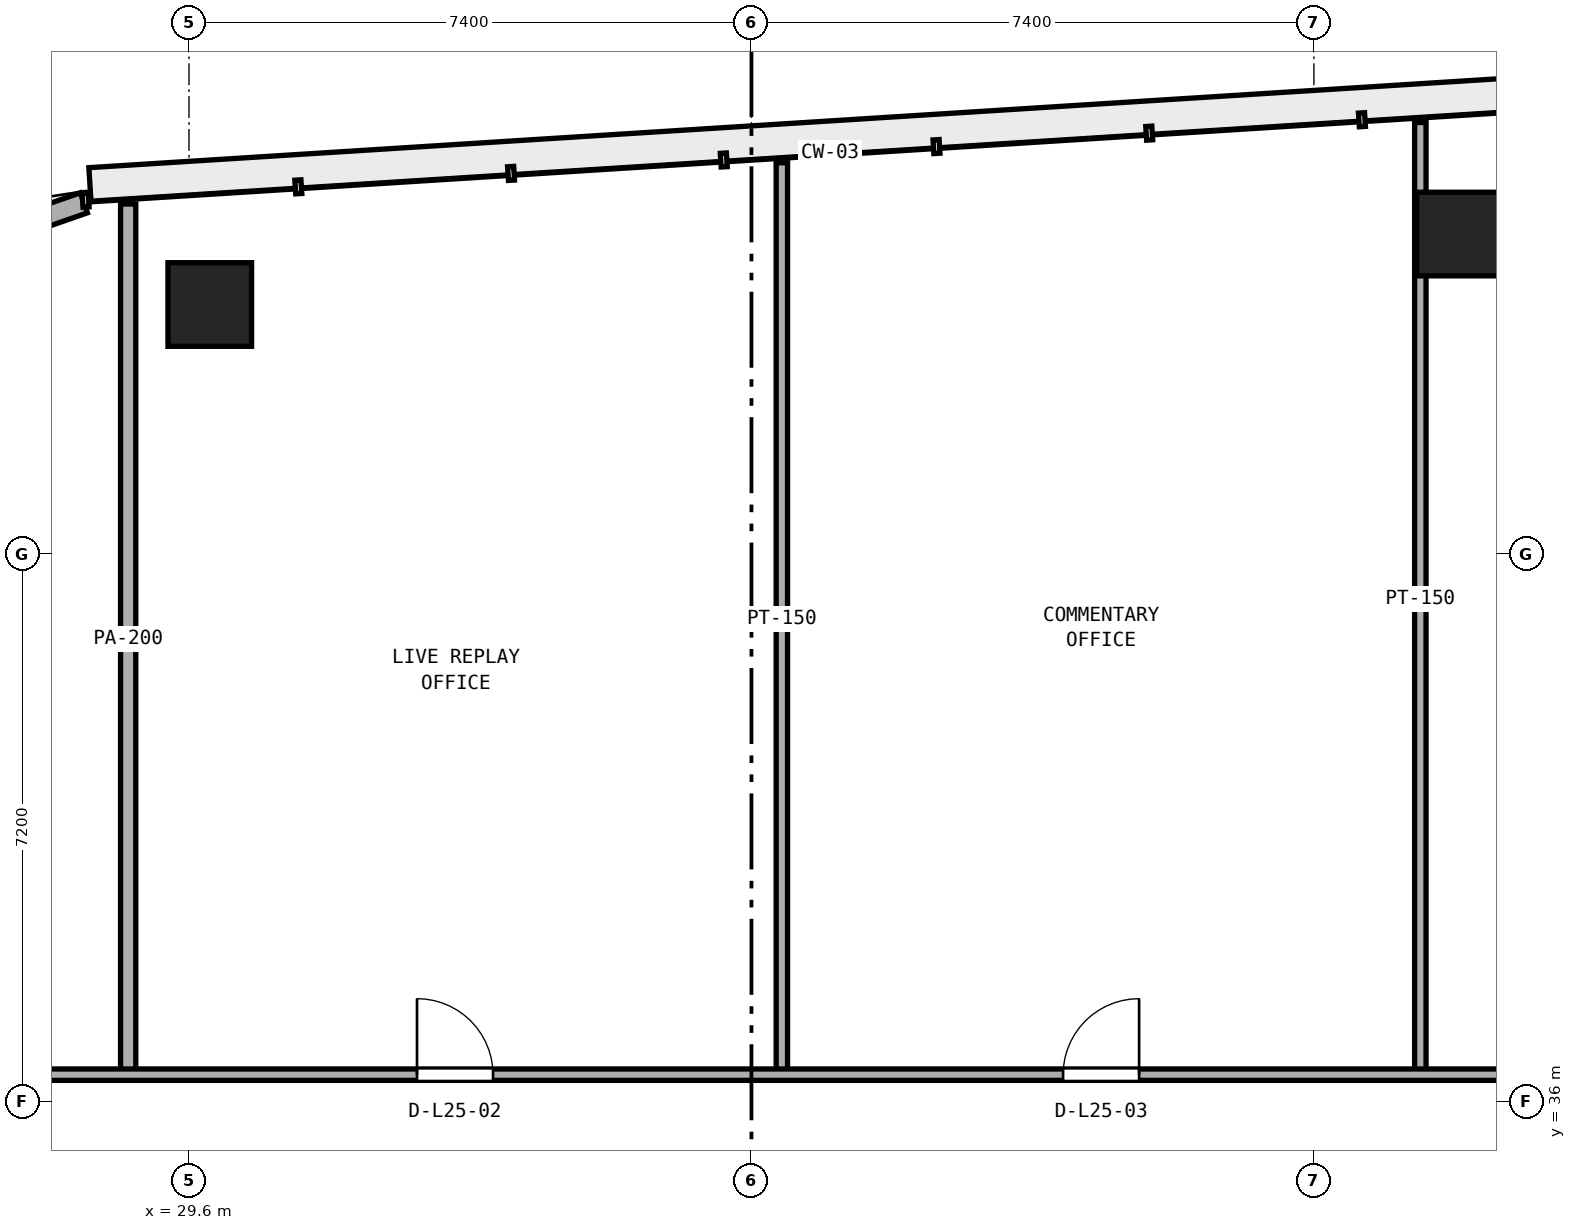
"""IFC4 building model, lengths in metres.
Left out: names, types, materials, properties, quantities, classifications, styles, units other than length and angle.
Written with IfcOpenShell. Run it as: python <this file> out.ifc"""

import sys

from ifc_helpers import new_model, si_unit, direction, frame, frame_2d, origin, origin_2d, place, context, subcontext, project, spatial, rectangle, extrude, element, fill, save


model = new_model("IFC4")
c1 = context("Model", 3, precision=1e-05, world=origin(), true_north=direction((0.0, 1.0)))
c2 = subcontext(c1, "Body", "Model", "MODEL_VIEW")
j1 = project(units=[si_unit("LENGTHUNIT", "METRE"), si_unit("PLANEANGLEUNIT", "RADIAN")], contexts=[c1])
p1 = place(None, origin())
s1 = spatial("IfcSite", under=j1, at=p1, CompositionType="ELEMENT")
p2 = place(p1, origin())
s2 = spatial("IfcBuilding", under=s1, at=p2, CompositionType="ELEMENT")
p3 = place(p2, frame((0.0, 0.0, 101.0)))
s3 = spatial("IfcBuildingStorey", under=s2, at=p3, CompositionType="ELEMENT", Elevation=101.0)
for number, where, z_axis, x_axis in (
    (1, (46.302, 47.409, 0.0), (0.0, 0.0, 1.0), (1.0, 0.0, 0.0)),
    (2, (29.874, 46.482, 0.0), (0.0, 0.0, 1.0), (1.0, 0.0, 0.0)),
):
    element("IfcColumn", number, at=place(p3, frame(where, z_axis=z_axis, x_axis=x_axis)), inside=s3, PredefinedType="COLUMN", context=c2, shape_type="SweptSolid", body=[
        extrude(rectangle(XDim=1.1, YDim=1.1, at=origin_2d()), origin(), (0.0, 0.0, 1.0), 3.8),
    ])
p4 = place(p3, frame((45.8, 36.35, 0.0), z_axis=(0.0, 0.0, 1.0), x_axis=(0.0, 1.0, 0.0)))
e3 = element("IfcWall", 3, at=p4, inside=s3, PredefinedType="PARTITIONING", context=c2, shape_type="SweptSolid", body=[
    extrude(rectangle(XDim=12.526, YDim=0.15, at=frame_2d((6.263, 0.0))), origin(), (0.0, 0.0, 1.0), 3.525),
])
p5 = place(p3, frame((37.4, 36.35, 0.0), z_axis=(0.0, 0.0, 1.0), x_axis=(0.0, 1.0, 0.0)))
e4 = element("IfcWall", 4, at=p5, inside=s3, PredefinedType="PARTITIONING", context=c2, shape_type="SweptSolid", body=[
    extrude(rectangle(XDim=11.997, YDim=0.15, at=frame_2d((5.998, 0.0))), origin(), (0.0, 0.0, 1.0), 3.525),
])
p6 = place(p3, frame((28.8, 36.35, 0.0), z_axis=(0.0, 0.0, 1.0), x_axis=(0.0, 1.0, 0.0)))
e5 = element("IfcWall", 5, at=p6, inside=s3, PredefinedType="PARTITIONING", context=c2, shape_type="SweptSolid", body=[
    extrude(rectangle(XDim=11.454, YDim=0.2, at=frame_2d((5.727, 0.0))), origin(), (0.0, 0.0, 1.0), 3.525),
])
p7 = place(p3, frame((22.45, 36.35, 0.0), z_axis=(0.0, 0.0, 1.0), x_axis=(1.0, 0.0, 0.0)))
e6 = element("IfcWall", 6, at=p7, inside=s3, PredefinedType="PARTITIONING", context=c2, shape_type="SweptSolid", body=[
    extrude(rectangle(XDim=29.1, YDim=0.15, at=frame_2d((14.55, 0.0))), origin(), (0.0, 0.0, 1.0), 3.525),
])
p8 = place(p7, frame((2.795, 0.0, 0.0)))
e7 = element("IfcOpeningElement", 7, at=p8, cuts=e6, PredefinedType="OPENING", context=c2, shape_type="SweptSolid", body=[
    extrude(rectangle(XDim=1.0, YDim=2.12, at=frame_2d((0.5, 1.06))), frame((0.0, 0.085, 0.0), z_axis=(0.0, -1.0, 0.0), x_axis=(1.0, 0.0, 0.0)), (0.0, 0.0, 1.0), 0.17),
])
p9 = place(p7, frame((10.15, 0.0, 0.0)))
e8 = element("IfcOpeningElement", 8, at=p9, cuts=e6, PredefinedType="OPENING", context=c2, shape_type="SweptSolid", body=[
    extrude(rectangle(XDim=1.0, YDim=2.12, at=frame_2d((0.5, 1.06))), frame((0.0, 0.085, 0.0), z_axis=(0.0, -1.0, 0.0), x_axis=(1.0, 0.0, 0.0)), (0.0, 0.0, 1.0), 0.17),
])
p10 = place(p7, frame((18.65, 0.0, 0.0)))
e9 = element("IfcOpeningElement", 9, at=p10, cuts=e6, PredefinedType="OPENING", context=c2, shape_type="SweptSolid", body=[
    extrude(rectangle(XDim=1.0, YDim=2.12, at=frame_2d((0.5, 1.06))), frame((0.0, 0.085, 0.0), z_axis=(0.0, -1.0, 0.0), x_axis=(1.0, 0.0, 0.0)), (0.0, 0.0, 1.0), 0.17),
])
p11 = place(p7, frame((25.605, 0.0, 0.0)))
e10 = element("IfcOpeningElement", 10, at=p11, cuts=e6, PredefinedType="OPENING", context=c2, shape_type="SweptSolid", body=[
    extrude(rectangle(XDim=1.0, YDim=2.12, at=frame_2d((0.5, 1.06))), frame((0.0, 0.085, 0.0), z_axis=(0.0, -1.0, 0.0), x_axis=(1.0, 0.0, 0.0)), (0.0, 0.0, 1.0), 0.17),
])
p12 = place(p3, frame((28.217, 47.82, 0.0), z_axis=(0.0, 0.0, 1.0), x_axis=(-0.944478751803, -0.328572499447, 0.0)))
e11 = element("IfcWall", 11, at=p12, inside=s3, PredefinedType="STANDARD", context=c2, shape_type="SweptSolid", body=[
    extrude(rectangle(XDim=2.19, YDim=0.28, at=frame_2d((1.095, 0.0))), origin(), (0.0, 0.0, 1.0), 3.525),
])
p13 = place(p9, origin())
e12 = element("IfcDoor", 12, at=p13, inside=s3, OperationType="SINGLE_SWING_LEFT", PredefinedType="DOOR", context=c2, shape_type="SweptSolid", body=[
    extrude(rectangle(XDim=1.0, YDim=2.12, at=frame_2d((0.5, 1.06))), frame((0.0, 0.025, 0.0), z_axis=(0.0, -1.0, 0.0), x_axis=(1.0, 0.0, 0.0)), (0.0, 0.0, 1.0), 0.05),
])
fill(e8, e12)
p14 = place(p10, origin())
e13 = element("IfcDoor", 13, at=p14, inside=s3, OperationType="SINGLE_SWING_RIGHT", PredefinedType="DOOR", context=c2, shape_type="SweptSolid", body=[
    extrude(rectangle(XDim=1.0, YDim=2.12, at=frame_2d((0.5, 1.06))), frame((0.0, 0.025, 0.0), z_axis=(0.0, -1.0, 0.0), x_axis=(1.0, 0.0, 0.0)), (0.0, 0.0, 1.0), 0.05),
])
fill(e9, e13)
save(model, sys.argv[1])
